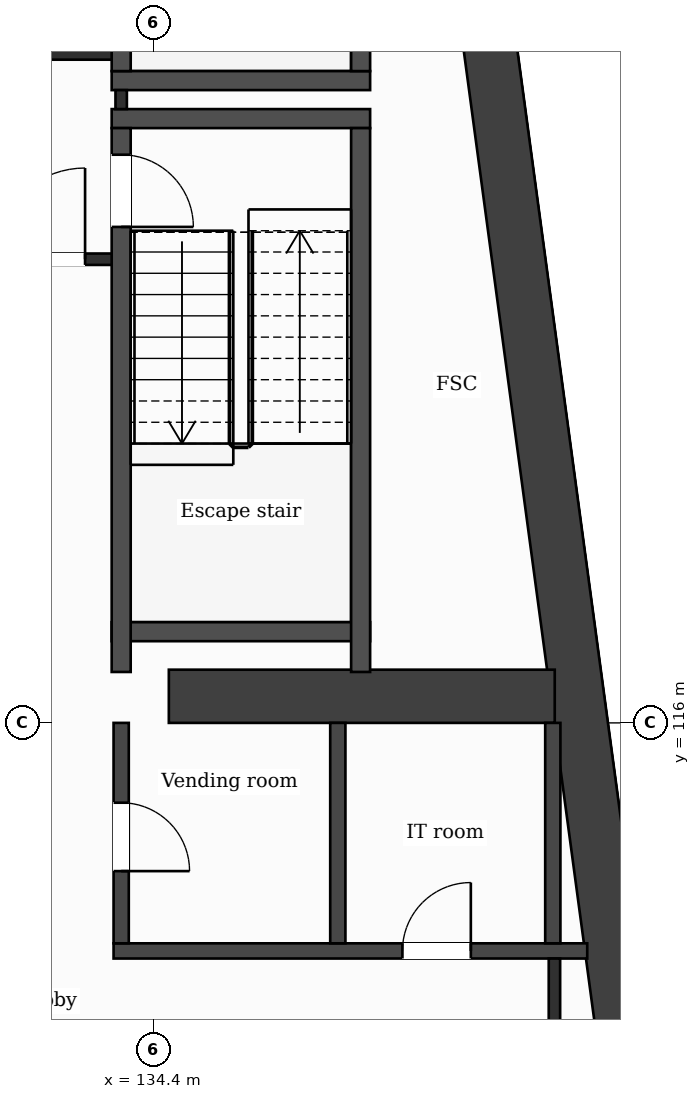
"""IFC4 building model, lengths in metres.
Left out: names, types, materials, properties, quantities, classifications, styles, units other than length and angle.
Written with IfcOpenShell. Run it as: python <this file> out.ifc"""

import sys

from ifc_helpers import new_model, si_unit, direction, frame, frame_2d, origin, place, context, subcontext, project, spatial, rectangle, extrude, element, fill, save


model = new_model("IFC4")
c1 = context("Model", 3, precision=1e-05, world=origin(), true_north=direction((0.0, 1.0)))
c2 = subcontext(c1, "Body", "Model", "MODEL_VIEW")
j1 = project(units=[si_unit("LENGTHUNIT", "METRE"), si_unit("PLANEANGLEUNIT", "RADIAN")], contexts=[c1])
p1 = place(None, origin())
s1 = spatial("IfcSite", under=j1, at=p1, CompositionType="ELEMENT")
p2 = place(p1, origin())
s2 = spatial("IfcBuilding", under=s1, at=p2, CompositionType="ELEMENT")
p3 = place(p2, frame((0.0, 0.0, 270.1)))
s3 = spatial("IfcBuildingStorey", under=s2, at=p3, CompositionType="ELEMENT", Elevation=270.1)
p4 = place(p3, frame((137.863, 132.05, 0.0), z_axis=(0.0, 0.0, 1.0), x_axis=(0.133406218907, -0.991061441464, 0.0)))
e1 = element("IfcWall", 1, at=p4, inside=s3, PredefinedType="SHEAR", context=c2, shape_type="SweptSolid", body=[
    extrude(rectangle(XDim=21.492, YDim=0.7, at=frame_2d((10.746, 0.0))), origin(), (0.0, 0.0, 1.0), 3.7),
])
p5 = place(p3, frame((134.6, 116.35, 0.0), z_axis=(0.0, 0.0, 1.0), x_axis=(1.0, 0.0, 0.0)))
e2 = element("IfcWall", 2, at=p5, inside=s3, PredefinedType="SHEAR", context=c2, shape_type="SweptSolid", body=[
    extrude(rectangle(XDim=5.077, YDim=0.7, at=frame_2d((2.539, 0.0))), origin(), (0.0, 0.0, 1.0), 3.7),
])
p6 = place(p3, frame((133.873, 113.0, 0.0), z_axis=(0.0, 0.0, 1.0), x_axis=(1.0, 0.0, 0.0)))
e3 = element("IfcWall", 3, at=p6, inside=s3, PredefinedType="PARTITIONING", context=c2, shape_type="SweptSolid", body=[
    extrude(rectangle(XDim=6.231, YDim=0.2, at=frame_2d((3.116, 0.0))), origin(), (0.0, 0.0, 1.0), 3.38),
])
p7 = place(p6, frame((3.8, 0.0, 0.0)))
e4 = element("IfcOpeningElement", 4, at=p7, cuts=e3, PredefinedType="OPENING", context=c2, shape_type="SweptSolid", body=[
    extrude(rectangle(XDim=0.9, YDim=2.1, at=frame_2d((0.45, 1.05))), frame((0.0, 0.11, 0.0), z_axis=(0.0, -1.0, 0.0), x_axis=(1.0, 0.0, 0.0)), (0.0, 0.0, 1.0), 0.22),
])
p8 = place(p3, frame((133.848, 117.2, 0.0), z_axis=(0.0, 0.0, 1.0), x_axis=(1.0, 0.0, 0.0)))
e5 = element("IfcWall", 5, at=p8, inside=s3, PredefinedType="PARTITIONING", context=c2, shape_type="SweptSolid", body=[
    extrude(rectangle(XDim=3.4, YDim=0.25, at=frame_2d((1.7, 0.0))), origin(), (0.0, 0.0, 1.0), 3.38),
])
p9 = place(p3, frame((131.573, 122.1, 0.0), z_axis=(0.0, 0.0, 1.0), x_axis=(1.0, 0.0, 0.0)))
e6 = element("IfcWall", 6, at=p9, inside=s3, PredefinedType="PARTITIONING", context=c2, shape_type="SweptSolid", body=[
    extrude(rectangle(XDim=2.4, YDim=0.15, at=frame_2d((1.2, 0.0))), origin(), (0.0, 0.0, 1.0), 3.38),
])
p10 = place(p9, frame((0.725, 0.0, 0.0)))
e7 = element("IfcOpeningElement", 7, at=p10, cuts=e6, PredefinedType="OPENING", context=c2, shape_type="SweptSolid", body=[
    extrude(rectangle(XDim=1.2, YDim=2.1, at=frame_2d((0.6, 1.05))), frame((0.0, 0.085, 0.0), z_axis=(0.0, -1.0, 0.0), x_axis=(1.0, 0.0, 0.0)), (0.0, 0.0, 1.0), 0.17),
])
for number, where, z_axis, x_axis in (
    (8, (133.848, 123.95, 0.0), (0.0, 0.0, 1.0), (1.0, 0.0, 0.0)),
    (9, (133.848, 124.45, 0.0), (0.0, 0.0, 1.0), (1.0, 0.0, 0.0)),
):
    element("IfcWall", number, at=place(p3, frame(where, z_axis=z_axis, x_axis=x_axis)), inside=s3, PredefinedType="PARTITIONING", context=c2, shape_type="SweptSolid", body=[
        extrude(rectangle(XDim=3.4, YDim=0.25, at=frame_2d((1.7, 0.0))), origin(), (0.0, 0.0, 1.0), 3.38),
    ])
p11 = place(p3, frame((131.549, 124.8, 0.0), z_axis=(0.0, 0.0, 1.0), x_axis=(1.0, 0.0, 0.0)))
e10 = element("IfcWall", 10, at=p11, inside=s3, PredefinedType="PARTITIONING", context=c2, shape_type="SweptSolid", body=[
    extrude(rectangle(XDim=2.549, YDim=0.15, at=frame_2d((1.275, 0.0))), origin(), (0.0, 0.0, 1.0), 3.38),
])
p12 = place(p3, frame((133.973, 113.1, 0.0), z_axis=(0.0, 0.0, 1.0), x_axis=(0.0, 1.0, 0.0)))
e11 = element("IfcWall", 11, at=p12, inside=s3, PredefinedType="PARTITIONING", context=c2, shape_type="SweptSolid", body=[
    extrude(rectangle(XDim=2.9, YDim=0.2, at=frame_2d((1.45, 0.0))), origin(), (0.0, 0.0, 1.0), 3.38),
])
p13 = place(p12, frame((0.95, 0.0, 0.0)))
e12 = element("IfcOpeningElement", 12, at=p13, cuts=e11, PredefinedType="OPENING", context=c2, shape_type="SweptSolid", body=[
    extrude(rectangle(XDim=0.9, YDim=2.1, at=frame_2d((0.45, 1.05))), frame((0.0, 0.11, 0.0), z_axis=(0.0, -1.0, 0.0), x_axis=(1.0, 0.0, 0.0)), (0.0, 0.0, 1.0), 0.22),
])
p14 = place(p3, frame((133.973, 124.075, 0.0), z_axis=(0.0, 0.0, 1.0), x_axis=(0.0, 1.0, 0.0)))
e13 = element("IfcWall", 13, at=p14, inside=s3, PredefinedType="PARTITIONING", context=c2, shape_type="SweptSolid", body=[
    extrude(rectangle(XDim=0.25, YDim=0.15, at=frame_2d((0.125, 0.0))), origin(), (0.0, 0.0, 1.0), 3.38),
])
p15 = place(p3, frame((133.973, 116.67, 0.0), z_axis=(0.0, 0.0, 1.0), x_axis=(0.0, 1.0, 0.0)))
e14 = element("IfcWall", 14, at=p15, inside=s3, PredefinedType="PARTITIONING", context=c2, shape_type="SweptSolid", body=[
    extrude(rectangle(XDim=7.155, YDim=0.25, at=frame_2d((3.578, 0.0))), origin(), (0.0, 0.0, 1.0), 3.38),
])
p16 = place(p15, frame((5.855, 0.0, 0.0)))
e15 = element("IfcOpeningElement", 15, at=p16, cuts=e14, PredefinedType="OPENING", context=c2, shape_type="SweptSolid", body=[
    extrude(rectangle(XDim=0.95, YDim=2.1, at=frame_2d((0.475, 1.05))), frame((0.0, 0.135, 0.0), z_axis=(0.0, -1.0, 0.0), x_axis=(1.0, 0.0, 0.0)), (0.0, 0.0, 1.0), 0.27),
])
p17 = place(p3, frame((133.973, 124.575, 0.0), z_axis=(0.0, 0.0, 1.0), x_axis=(0.0, 1.0, 0.0)))
e16 = element("IfcWall", 16, at=p17, inside=s3, PredefinedType="PARTITIONING", context=c2, shape_type="SweptSolid", body=[
    extrude(rectangle(XDim=7.155, YDim=0.25, at=frame_2d((3.578, 0.0))), origin(), (0.0, 0.0, 1.0), 3.38),
])
p18 = place(p17, frame((5.325, 0.0, 0.0)))
e17 = element("IfcOpeningElement", 17, at=p18, cuts=e16, PredefinedType="OPENING", context=c2, shape_type="SweptSolid", body=[
    extrude(rectangle(XDim=1.0, YDim=2.1, at=frame_2d((0.5, 1.05))), frame((0.0, 0.135, 0.0), z_axis=(0.0, -1.0, 0.0), x_axis=(1.0, 0.0, 0.0)), (0.0, 0.0, 1.0), 0.27),
])
p19 = place(p3, frame((136.823, 113.1, 0.0), z_axis=(0.0, 0.0, 1.0), x_axis=(0.0, 1.0, 0.0)))
e18 = element("IfcWall", 18, at=p19, inside=s3, PredefinedType="PARTITIONING", context=c2, shape_type="SweptSolid", body=[
    extrude(rectangle(XDim=2.9, YDim=0.2, at=frame_2d((1.45, 0.0))), origin(), (0.0, 0.0, 1.0), 3.38),
])
for number, where, z_axis, x_axis in (
    (19, (137.123, 116.67, 0.0), (0.0, 0.0, 1.0), (0.0, 1.0, 0.0)),
    (20, (137.123, 124.575, 0.0), (0.0, 0.0, 1.0), (0.0, 1.0, 0.0)),
):
    element("IfcWall", number, at=place(p3, frame(where, z_axis=z_axis, x_axis=x_axis)), inside=s3, PredefinedType="PARTITIONING", context=c2, shape_type="SweptSolid", body=[
        extrude(rectangle(XDim=7.155, YDim=0.25, at=frame_2d((3.578, 0.0))), origin(), (0.0, 0.0, 1.0), 3.38),
    ])
p20 = place(p3, frame((139.652, 113.1, 0.0), z_axis=(0.0, 0.0, 1.0), x_axis=(0.0, 1.0, 0.0)))
e21 = element("IfcWall", 21, at=p20, inside=s3, PredefinedType="PARTITIONING", context=c2, shape_type="SweptSolid", body=[
    extrude(rectangle(XDim=2.9, YDim=0.2, at=frame_2d((1.45, 0.0))), origin(), (0.0, 0.0, 1.0), 3.38),
])
p21 = place(p3, frame((139.673, 111.1, 0.0), z_axis=(0.0, 0.0, 1.0), x_axis=(0.0, 1.0, 0.0)))
e22 = element("IfcWall", 22, at=p21, inside=s3, PredefinedType="PARTITIONING", context=c2, shape_type="SweptSolid", body=[
    extrude(rectangle(XDim=1.8, YDim=0.15, at=frame_2d((0.9, 0.0))), origin(), (0.0, 0.0, 1.0), 3.38),
])
p22 = place(p10, origin())
e23 = element("IfcDoor", 23, at=p22, inside=s3, OperationType="SINGLE_SWING_RIGHT", PredefinedType="DOOR", context=c2, shape_type="SweptSolid", body=[
    extrude(rectangle(XDim=1.2, YDim=2.1, at=frame_2d((0.6, 1.05))), frame((0.0, 0.025, 0.0), z_axis=(0.0, -1.0, 0.0), x_axis=(1.0, 0.0, 0.0)), (0.0, 0.0, 1.0), 0.05),
])
fill(e7, e23)
p23 = place(p16, origin())
e24 = element("IfcDoor", 24, at=p23, inside=s3, OperationType="SINGLE_SWING_LEFT", PredefinedType="DOOR", context=c2, shape_type="SweptSolid", body=[
    extrude(rectangle(XDim=0.95, YDim=2.1, at=frame_2d((0.475, 1.05))), frame((0.0, 0.025, 0.0), z_axis=(0.0, -1.0, 0.0), x_axis=(1.0, 0.0, 0.0)), (0.0, 0.0, 1.0), 0.05),
])
fill(e15, e24)
p24 = place(p7, origin())
e25 = element("IfcDoor", 25, at=p24, inside=s3, OperationType="SINGLE_SWING_RIGHT", PredefinedType="DOOR", context=c2, shape_type="SweptSolid", body=[
    extrude(rectangle(XDim=0.9, YDim=2.1, at=frame_2d((0.45, 1.05))), frame((0.0, 0.025, 0.0), z_axis=(0.0, -1.0, 0.0), x_axis=(1.0, 0.0, 0.0)), (0.0, 0.0, 1.0), 0.05),
])
fill(e4, e25)
p25 = place(p13, origin())
e26 = element("IfcDoor", 26, at=p25, inside=s3, OperationType="SINGLE_SWING_LEFT", PredefinedType="DOOR", context=c2, shape_type="SweptSolid", body=[
    extrude(rectangle(XDim=0.9, YDim=2.1, at=frame_2d((0.45, 1.05))), frame((0.0, 0.025, 0.0), z_axis=(0.0, -1.0, 0.0), x_axis=(1.0, 0.0, 0.0)), (0.0, 0.0, 1.0), 0.05),
])
fill(e12, e26)
save(model, sys.argv[1])
